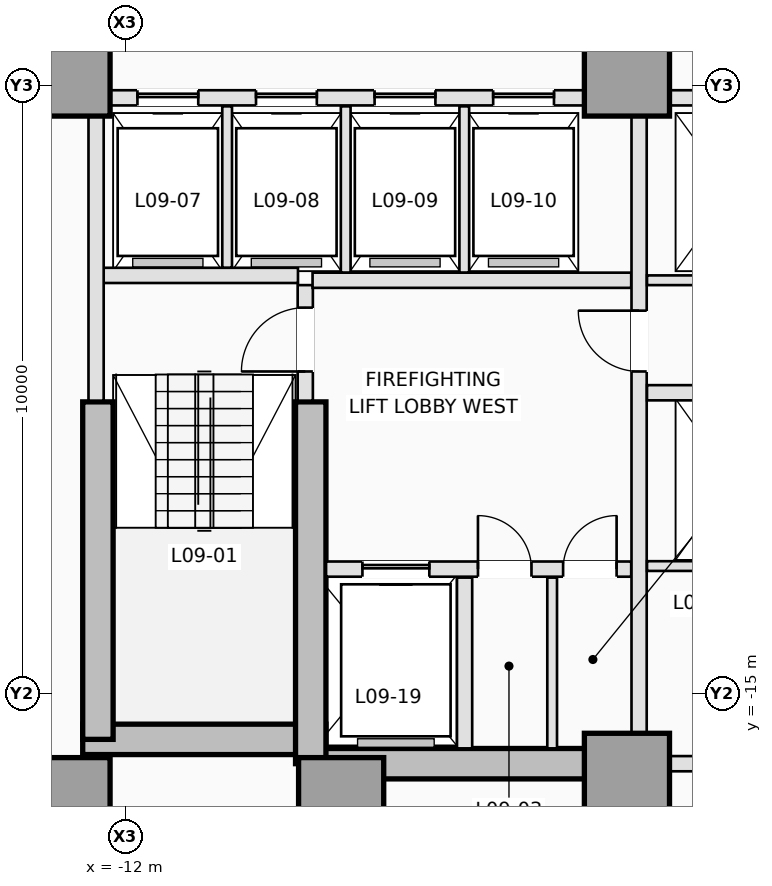
"""IFC4 building model, lengths in metres.
Left out: names, types, materials, properties, quantities, classifications, styles, units other than length and angle.
Written with IfcOpenShell. Run it as: python <this file> out.ifc"""

import sys

from ifc_helpers import new_model, si_unit, direction, frame, frame_2d, origin, origin_2d, place, context, subcontext, project, spatial, rectangle, extrude, element, fill, save


model = new_model("IFC4")
c1 = context("Model", 3, precision=1e-05, world=origin(), true_north=direction((0.0, 1.0)))
c2 = subcontext(c1, "Body", "Model", "MODEL_VIEW")
j1 = project(units=[si_unit("LENGTHUNIT", "METRE"), si_unit("PLANEANGLEUNIT", "RADIAN")], contexts=[c1])
p1 = place(None, origin())
s1 = spatial("IfcSite", under=j1, at=p1, CompositionType="ELEMENT")
p2 = place(p1, origin())
s2 = spatial("IfcBuilding", under=s1, at=p2, CompositionType="ELEMENT")
p3 = place(p2, frame((0.0, 0.0, 38.1)))
s3 = spatial("IfcBuildingStorey", under=s2, at=p3, CompositionType="ELEMENT", Elevation=38.1)
p4 = place(p3, frame((-12.7, -15.75, 0.0), z_axis=(0.0, 0.0, 1.0), x_axis=(1.0, 0.0, 0.0)))
e1 = element("IfcWall", 1, at=p4, inside=s3, PredefinedType="SHEAR", context=c2, shape_type="SweptSolid", body=[
    extrude(rectangle(XDim=4.0, YDim=0.5, at=frame_2d((2.0, 0.0))), origin(), (0.0, 0.0, 1.0), 3.5),
])
p5 = place(p3, frame((-8.95, -16.15, 0.0), z_axis=(0.0, 0.0, 1.0), x_axis=(1.0, 0.0, 0.0)))
e2 = element("IfcWall", 2, at=p5, inside=s3, PredefinedType="SHEAR", context=c2, shape_type="SweptSolid", body=[
    extrude(rectangle(XDim=5.2, YDim=0.5, at=frame_2d((2.6, 0.0))), origin(), (0.0, 0.0, 1.0), 3.5),
])
p6 = place(p3, frame((-12.45, -15.75, 0.0), z_axis=(0.0, 0.0, 1.0), x_axis=(0.0, 1.0, 0.0)))
e3 = element("IfcWall", 3, at=p6, inside=s3, PredefinedType="SHEAR", context=c2, shape_type="SweptSolid", body=[
    extrude(rectangle(XDim=5.55, YDim=0.5, at=frame_2d((2.775, 0.0))), origin(), (0.0, 0.0, 1.0), 3.5),
])
p7 = place(p3, frame((-8.95, -16.15, 0.0), z_axis=(0.0, 0.0, 1.0), x_axis=(0.0, 1.0, 0.0)))
e4 = element("IfcWall", 4, at=p7, inside=s3, PredefinedType="SHEAR", context=c2, shape_type="SweptSolid", body=[
    extrude(rectangle(XDim=5.95, YDim=0.5, at=frame_2d((2.975, 0.0))), origin(), (0.0, 0.0, 1.0), 3.5),
])
for number, where, z_axis, x_axis in (
    (5, (-12.95, -16.75, 0.0), (0.0, 0.0, 1.0), (1.0, 0.0, 0.0)),
    (6, (-8.45, -16.75, 0.0), (0.0, 0.0, 1.0), (1.0, 0.0, 0.0)),
    (7, (-3.75, -16.35, 0.0), (0.0, 0.0, 1.0), (1.0, 0.0, 0.0)),
    (8, (-12.95, -4.8, 0.0), (0.0, 0.0, 1.0), (1.0, 0.0, 0.0)),
    (9, (-3.75, -4.8, 0.0), (0.0, 0.0, 1.0), (1.0, 0.0, 0.0)),
):
    element("IfcColumn", number, at=place(p3, frame(where, z_axis=z_axis, x_axis=x_axis)), inside=s3, PredefinedType="COLUMN", context=c2, shape_type="SweptSolid", body=[
        extrude(rectangle(XDim=1.4, YDim=1.4, at=origin_2d()), origin(), (0.0, 0.0, 1.0), 3.5),
    ])
p8 = place(p3, frame((-9.04, -10.18, 0.0), z_axis=(0.0, 0.0, 1.0), x_axis=(0.0, 1.0, 0.0)))
e10 = element("IfcWall", 10, at=p8, inside=s3, PredefinedType="PARTITIONING", context=c2, shape_type="SweptSolid", body=[
    extrude(rectangle(XDim=1.9, YDim=0.25, at=frame_2d((0.95, 0.0))), origin(), (0.0, 0.0, 1.0), 3.25),
])
p9 = place(p8, frame((0.48, 0.0, 0.0)))
e11 = element("IfcOpeningElement", 11, at=p9, cuts=e10, PredefinedType="OPENING", context=c2, shape_type="SweptSolid", body=[
    extrude(rectangle(XDim=1.05, YDim=2.15, at=frame_2d((0.525, 1.075))), frame((0.0, 0.135, 0.0), z_axis=(0.0, -1.0, 0.0), x_axis=(1.0, 0.0, 0.0)), (0.0, 0.0, 1.0), 0.27),
])
p10 = place(p3, frame((-12.38, -8.12, 0.0), z_axis=(0.0, 0.0, 1.0), x_axis=(1.0, 0.0, 0.0)))
e12 = element("IfcWall", 12, at=p10, inside=s3, PredefinedType="PARTITIONING", context=c2, shape_type="SweptSolid", body=[
    extrude(rectangle(XDim=3.22, YDim=0.25, at=frame_2d((1.61, 0.0))), origin(), (0.0, 0.0, 1.0), 3.25),
])
p11 = place(p3, frame((-12.48, -10.18, 0.0), z_axis=(0.0, 0.0, 1.0), x_axis=(0.0, 1.0, 0.0)))
e13 = element("IfcWall", 13, at=p11, inside=s3, PredefinedType="PARTITIONING", context=c2, shape_type="SweptSolid", body=[
    extrude(rectangle(XDim=4.678, YDim=0.25, at=frame_2d((2.339, 0.0))), origin(), (0.0, 0.0, 1.0), 3.25),
])
p12 = place(p3, frame((-8.698, -12.95, 0.0), z_axis=(0.0, 0.0, 1.0), x_axis=(1.0, 0.0, 0.0)))
e14 = element("IfcWall", 14, at=p12, inside=s3, PredefinedType="PARTITIONING", context=c2, shape_type="SweptSolid", body=[
    extrude(rectangle(XDim=5.018, YDim=0.25, at=frame_2d((2.509, 0.0))), origin(), (0.0, 0.0, 1.0), 3.25),
])
p13 = place(p12, frame((0.598, 0.0, 0.0)))
e15 = element("IfcOpeningElement", 15, at=p13, cuts=e14, PredefinedType="OPENING", context=c2, shape_type="SweptSolid", body=[
    extrude(rectangle(XDim=1.1, YDim=2.15, at=frame_2d((0.55, 1.075))), frame((0.0, 0.135, 0.0), z_axis=(0.0, -1.0, 0.0), x_axis=(1.0, 0.0, 0.0)), (0.0, 0.0, 1.0), 0.27),
])
p14 = place(p12, frame((2.498, 0.0, 0.0)))
e16 = element("IfcOpeningElement", 16, at=p14, cuts=e14, PredefinedType="OPENING", context=c2, shape_type="SweptSolid", body=[
    extrude(rectangle(XDim=0.88, YDim=2.1, at=frame_2d((0.44, 1.05))), frame((0.0, 0.135, 0.0), z_axis=(0.0, -1.0, 0.0), x_axis=(1.0, 0.0, 0.0)), (0.0, 0.0, 1.0), 0.27),
])
p15 = place(p12, frame((3.898, 0.0, 0.0)))
e17 = element("IfcOpeningElement", 17, at=p15, cuts=e14, PredefinedType="OPENING", context=c2, shape_type="SweptSolid", body=[
    extrude(rectangle(XDim=0.88, YDim=2.1, at=frame_2d((0.44, 1.05))), frame((0.0, 0.135, 0.0), z_axis=(0.0, -1.0, 0.0), x_axis=(1.0, 0.0, 0.0)), (0.0, 0.0, 1.0), 0.27),
])
p16 = place(p3, frame((-6.42, -15.898, 0.0), z_axis=(0.0, 0.0, 1.0), x_axis=(0.0, 1.0, 0.0)))
e18 = element("IfcWall", 18, at=p16, inside=s3, PredefinedType="PARTITIONING", context=c2, shape_type="SweptSolid", body=[
    extrude(rectangle(XDim=2.808, YDim=0.25, at=frame_2d((1.404, 0.0))), origin(), (0.0, 0.0, 1.0), 3.25),
])
p17 = place(p3, frame((-4.98, -15.898, 0.0), z_axis=(0.0, 0.0, 1.0), x_axis=(0.0, 1.0, 0.0)))
e19 = element("IfcWall", 19, at=p17, inside=s3, PredefinedType="PARTITIONING", context=c2, shape_type="SweptSolid", body=[
    extrude(rectangle(XDim=2.808, YDim=0.16, at=frame_2d((1.404, 0.0))), origin(), (0.0, 0.0, 1.0), 3.25),
])
p18 = place(p3, frame((-8.92, -8.2, 0.0), z_axis=(0.0, 0.0, 1.0), x_axis=(1.0, 0.0, 0.0)))
e20 = element("IfcWall", 20, at=p18, inside=s3, PredefinedType="PARTITIONING", context=c2, shape_type="SweptSolid", body=[
    extrude(rectangle(XDim=5.24, YDim=0.25, at=frame_2d((2.62, 0.0))), origin(), (0.0, 0.0, 1.0), 3.25),
])
p19 = place(p3, frame((-3.55, -15.648, 0.0), z_axis=(0.0, 0.0, 1.0), x_axis=(0.0, 1.0, 0.0)))
e21 = element("IfcWall", 21, at=p19, inside=s3, PredefinedType="PARTITIONING", context=c2, shape_type="SweptSolid", body=[
    extrude(rectangle(XDim=10.146, YDim=0.25, at=frame_2d((5.073, 0.0))), origin(), (0.0, 0.0, 1.0), 3.25),
])
p20 = place(p19, frame((5.948, 0.0, 0.0)))
e22 = element("IfcOpeningElement", 22, at=p20, cuts=e21, PredefinedType="OPENING", context=c2, shape_type="SweptSolid", body=[
    extrude(rectangle(XDim=1.0, YDim=2.15, at=frame_2d((0.5, 1.075))), frame((0.0, 0.135, 0.0), z_axis=(0.0, -1.0, 0.0), x_axis=(1.0, 0.0, 0.0)), (0.0, 0.0, 1.0), 0.27),
])
p21 = place(p3, frame((-12.248, -5.2, 0.0), z_axis=(0.0, 0.0, 1.0), x_axis=(1.0, 0.0, 0.0)))
e23 = element("IfcWall", 23, at=p21, inside=s3, PredefinedType="PARTITIONING", context=c2, shape_type="SweptSolid", body=[
    extrude(rectangle(XDim=7.796, YDim=0.25, at=frame_2d((3.898, 0.0))), origin(), (0.0, 0.0, 1.0), 3.25),
])
p22 = place(p21, frame((0.448, 0.0, 0.0)))
e24 = element("IfcOpeningElement", 24, at=p22, cuts=e23, PredefinedType="OPENING", context=c2, shape_type="SweptSolid", body=[
    extrude(rectangle(XDim=1.0, YDim=2.15, at=frame_2d((0.5, 1.075))), frame((0.0, 0.135, 0.0), z_axis=(0.0, -1.0, 0.0), x_axis=(1.0, 0.0, 0.0)), (0.0, 0.0, 1.0), 0.27),
])
p23 = place(p21, frame((2.398, 0.0, 0.0)))
e25 = element("IfcOpeningElement", 25, at=p23, cuts=e23, PredefinedType="OPENING", context=c2, shape_type="SweptSolid", body=[
    extrude(rectangle(XDim=1.0, YDim=2.15, at=frame_2d((0.5, 1.075))), frame((0.0, 0.135, 0.0), z_axis=(0.0, -1.0, 0.0), x_axis=(1.0, 0.0, 0.0)), (0.0, 0.0, 1.0), 0.27),
])
p24 = place(p21, frame((4.348, 0.0, 0.0)))
e26 = element("IfcOpeningElement", 26, at=p24, cuts=e23, PredefinedType="OPENING", context=c2, shape_type="SweptSolid", body=[
    extrude(rectangle(XDim=1.0, YDim=2.15, at=frame_2d((0.5, 1.075))), frame((0.0, 0.135, 0.0), z_axis=(0.0, -1.0, 0.0), x_axis=(1.0, 0.0, 0.0)), (0.0, 0.0, 1.0), 0.27),
])
p25 = place(p21, frame((6.298, 0.0, 0.0)))
e27 = element("IfcOpeningElement", 27, at=p25, cuts=e23, PredefinedType="OPENING", context=c2, shape_type="SweptSolid", body=[
    extrude(rectangle(XDim=1.0, YDim=2.15, at=frame_2d((0.5, 1.075))), frame((0.0, 0.135, 0.0), z_axis=(0.0, -1.0, 0.0), x_axis=(1.0, 0.0, 0.0)), (0.0, 0.0, 1.0), 0.27),
])
p26 = place(p3, frame((-3.048, -5.2, 0.0), z_axis=(0.0, 0.0, 1.0), x_axis=(1.0, 0.0, 0.0)))
e28 = element("IfcWall", 28, at=p26, inside=s3, PredefinedType="PARTITIONING", context=c2, shape_type="SweptSolid", body=[
    extrude(rectangle(XDim=2.098, YDim=0.25, at=frame_2d((1.049, 0.0))), origin(), (0.0, 0.0, 1.0), 3.25),
])
p27 = place(p3, frame((-10.325, -7.993, 0.0), z_axis=(0.0, 0.0, 1.0), x_axis=(0.0, 1.0, 0.0)))
e29 = element("IfcWall", 29, at=p27, inside=s3, PredefinedType="PARTITIONING", context=c2, shape_type="SweptSolid", body=[
    extrude(rectangle(XDim=2.653, YDim=0.16, at=frame_2d((1.326, 0.0))), origin(), (0.0, 0.0, 1.0), 3.25),
])
for number, where, z_axis, x_axis in (
    (30, (-8.375, -8.073, 0.0), (0.0, 0.0, 1.0), (0.0, 1.0, 0.0)),
    (31, (-6.425, -8.073, 0.0), (0.0, 0.0, 1.0), (0.0, 1.0, 0.0)),
):
    element("IfcWall", number, at=place(p3, frame(where, z_axis=z_axis, x_axis=x_axis)), inside=s3, PredefinedType="PARTITIONING", context=c2, shape_type="SweptSolid", body=[
        extrude(rectangle(XDim=2.733, YDim=0.16, at=frame_2d((1.366, 0.0))), origin(), (0.0, 0.0, 1.0), 3.25),
    ])
p28 = place(p3, frame((-3.048, -16.15, 0.0), z_axis=(0.0, 0.0, 1.0), x_axis=(1.0, 0.0, 0.0)))
e32 = element("IfcWall", 32, at=p28, inside=s3, PredefinedType="PARTITIONING", context=c2, shape_type="SweptSolid", body=[
    extrude(rectangle(XDim=6.096, YDim=0.25, at=frame_2d((3.048, 0.0))), origin(), (0.0, 0.0, 1.0), 2.3),
])
p29 = place(p3, frame((-3.42, -8.2, 0.0), z_axis=(0.0, 0.0, 1.0), x_axis=(1.0, 0.0, 0.0)))
e33 = element("IfcWall", 33, at=p29, inside=s3, PredefinedType="PARTITIONING", context=c2, shape_type="SweptSolid", body=[
    extrude(rectangle(XDim=2.47, YDim=0.16, at=frame_2d((1.235, 0.0))), origin(), (0.0, 0.0, 1.0), 3.25),
])
p30 = place(p3, frame((-3.42, -10.05, 0.0), z_axis=(0.0, 0.0, 1.0), x_axis=(1.0, 0.0, 0.0)))
e34 = element("IfcWall", 34, at=p30, inside=s3, PredefinedType="PARTITIONING", context=c2, shape_type="SweptSolid", body=[
    extrude(rectangle(XDim=2.47, YDim=0.25, at=frame_2d((1.235, 0.0))), origin(), (0.0, 0.0, 1.0), 3.25),
])
p31 = place(p3, frame((-3.42, -12.9, 0.0), z_axis=(0.0, 0.0, 1.0), x_axis=(1.0, 0.0, 0.0)))
e35 = element("IfcWall", 35, at=p31, inside=s3, PredefinedType="PARTITIONING", context=c2, shape_type="SweptSolid", body=[
    extrude(rectangle(XDim=6.84, YDim=0.16, at=frame_2d((3.42, 0.0))), origin(), (0.0, 0.0, 1.0), 3.25),
])
p32 = place(p31, frame((2.98, 0.0, 0.0)))
e36 = element("IfcOpeningElement", 36, at=p32, cuts=e35, PredefinedType="OPENING", context=c2, shape_type="SweptSolid", body=[
    extrude(rectangle(XDim=0.88, YDim=2.12, at=frame_2d((0.44, 1.06))), frame((0.0, 0.09, 0.0), z_axis=(0.0, -1.0, 0.0), x_axis=(1.0, 0.0, 0.0)), (0.0, 0.0, 1.0), 0.18),
])
p33 = place(p22, origin())
e37 = element("IfcDoor", 37, at=p33, inside=s3, OperationType="SLIDING_TO_LEFT", PredefinedType="DOOR", context=c2, shape_type="SweptSolid", body=[
    extrude(rectangle(XDim=1.0, YDim=2.15, at=frame_2d((0.5, 1.075))), frame((0.0, 0.025, 0.0), z_axis=(0.0, -1.0, 0.0), x_axis=(1.0, 0.0, 0.0)), (0.0, 0.0, 1.0), 0.05),
])
fill(e24, e37)
p34 = place(p23, origin())
e38 = element("IfcDoor", 38, at=p34, inside=s3, OperationType="SLIDING_TO_LEFT", PredefinedType="DOOR", context=c2, shape_type="SweptSolid", body=[
    extrude(rectangle(XDim=1.0, YDim=2.15, at=frame_2d((0.5, 1.075))), frame((0.0, 0.025, 0.0), z_axis=(0.0, -1.0, 0.0), x_axis=(1.0, 0.0, 0.0)), (0.0, 0.0, 1.0), 0.05),
])
fill(e25, e38)
p35 = place(p24, origin())
e39 = element("IfcDoor", 39, at=p35, inside=s3, OperationType="SLIDING_TO_LEFT", PredefinedType="DOOR", context=c2, shape_type="SweptSolid", body=[
    extrude(rectangle(XDim=1.0, YDim=2.15, at=frame_2d((0.5, 1.075))), frame((0.0, 0.025, 0.0), z_axis=(0.0, -1.0, 0.0), x_axis=(1.0, 0.0, 0.0)), (0.0, 0.0, 1.0), 0.05),
])
fill(e26, e39)
p36 = place(p25, origin())
e40 = element("IfcDoor", 40, at=p36, inside=s3, OperationType="SLIDING_TO_LEFT", PredefinedType="DOOR", context=c2, shape_type="SweptSolid", body=[
    extrude(rectangle(XDim=1.0, YDim=2.15, at=frame_2d((0.5, 1.075))), frame((0.0, 0.025, 0.0), z_axis=(0.0, -1.0, 0.0), x_axis=(1.0, 0.0, 0.0)), (0.0, 0.0, 1.0), 0.05),
])
fill(e27, e40)
p37 = place(p13, origin())
e41 = element("IfcDoor", 41, at=p37, inside=s3, OperationType="SLIDING_TO_LEFT", PredefinedType="DOOR", context=c2, shape_type="SweptSolid", body=[
    extrude(rectangle(XDim=1.1, YDim=2.15, at=frame_2d((0.55, 1.075))), frame((0.0, 0.025, 0.0), z_axis=(0.0, -1.0, 0.0), x_axis=(1.0, 0.0, 0.0)), (0.0, 0.0, 1.0), 0.05),
])
fill(e15, e41)
p38 = place(p9, origin())
e42 = element("IfcDoor", 42, at=p38, inside=s3, OperationType="SINGLE_SWING_LEFT", PredefinedType="DOOR", context=c2, shape_type="SweptSolid", body=[
    extrude(rectangle(XDim=1.05, YDim=2.15, at=frame_2d((0.525, 1.075))), frame((0.0, 0.025, 0.0), z_axis=(0.0, -1.0, 0.0), x_axis=(1.0, 0.0, 0.0)), (0.0, 0.0, 1.0), 0.05),
])
fill(e11, e42)
p39 = place(p14, origin())
e43 = element("IfcDoor", 43, at=p39, inside=s3, OperationType="SINGLE_SWING_LEFT", PredefinedType="TRAPDOOR", context=c2, shape_type="SweptSolid", body=[
    extrude(rectangle(XDim=0.88, YDim=2.1, at=frame_2d((0.44, 1.05))), frame((0.0, 0.025, 0.0), z_axis=(0.0, -1.0, 0.0), x_axis=(1.0, 0.0, 0.0)), (0.0, 0.0, 1.0), 0.05),
])
fill(e16, e43)
p40 = place(p15, origin())
e44 = element("IfcDoor", 44, at=p40, inside=s3, OperationType="SINGLE_SWING_RIGHT", PredefinedType="TRAPDOOR", context=c2, shape_type="SweptSolid", body=[
    extrude(rectangle(XDim=0.88, YDim=2.1, at=frame_2d((0.44, 1.05))), frame((0.0, 0.025, 0.0), z_axis=(0.0, -1.0, 0.0), x_axis=(1.0, 0.0, 0.0)), (0.0, 0.0, 1.0), 0.05),
])
fill(e17, e44)
p41 = place(p20, origin())
e45 = element("IfcDoor", 45, at=p41, inside=s3, OperationType="SINGLE_SWING_RIGHT", PredefinedType="DOOR", context=c2, shape_type="SweptSolid", body=[
    extrude(rectangle(XDim=1.0, YDim=2.15, at=frame_2d((0.5, 1.075))), frame((0.0, 0.025, 0.0), z_axis=(0.0, -1.0, 0.0), x_axis=(1.0, 0.0, 0.0)), (0.0, 0.0, 1.0), 0.05),
])
fill(e22, e45)
save(model, sys.argv[1])
